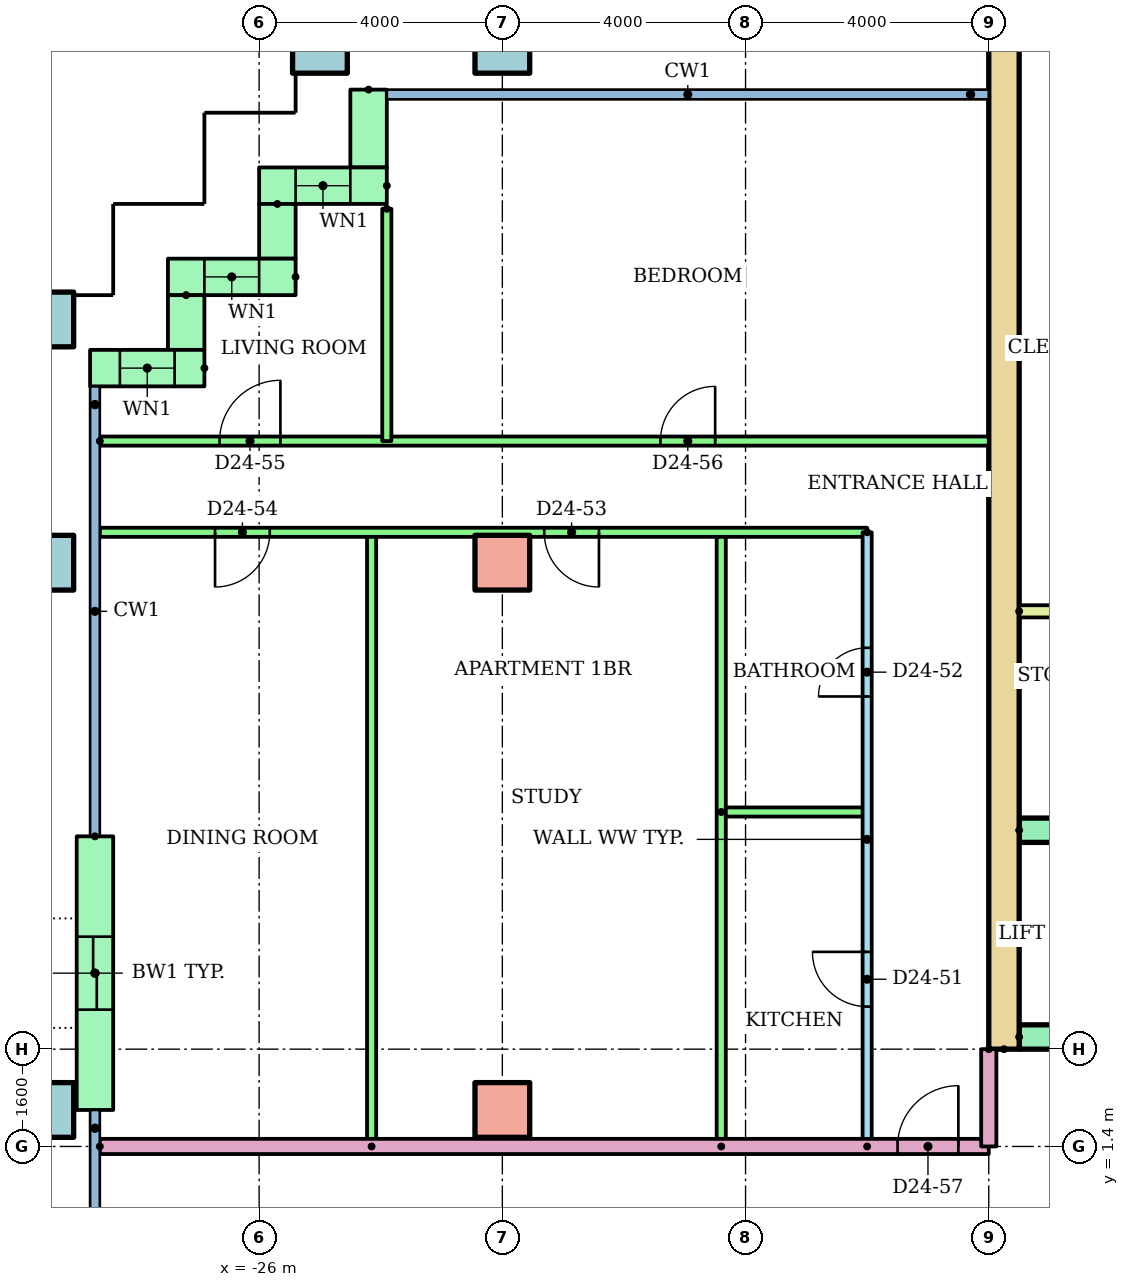
"""IFC4 building model, lengths in metres.
Left out: names, types, materials, properties, quantities, classifications, styles, units other than length and angle.
Written with IfcOpenShell. Run it as: python <this file> out.ifc"""

import sys

from ifc_helpers import new_model, si_unit, direction, frame, frame_2d, origin, origin_2d, place, context, subcontext, project, spatial, rectangle, hollow_rectangle, extrude, element, fill, save


model = new_model("IFC4")
c1 = context("Model", 3, precision=1e-05, world=origin(), true_north=direction((0.0, 1.0)))
c2 = subcontext(c1, "Body", "Model", "MODEL_VIEW")
j1 = project(units=[si_unit("LENGTHUNIT", "METRE"), si_unit("PLANEANGLEUNIT", "RADIAN")], contexts=[c1])
p1 = place(None, origin())
s1 = spatial("IfcSite", under=j1, at=p1, CompositionType="ELEMENT")
p2 = place(p1, origin())
s2 = spatial("IfcBuilding", under=s1, at=p2, CompositionType="ELEMENT")
p3 = place(p2, frame((0.0, 0.0, 93.5)))
s3 = spatial("IfcBuildingStorey", under=s2, at=p3, CompositionType="ELEMENT", Elevation=93.5)
p4 = place(p3, frame((-29.5, 2.0, 0.0)))
e1 = element("IfcColumn", 1, at=p4, inside=s3, PredefinedType="COLUMN", context=c2, shape_type="SweptSolid", body=[
    extrude(hollow_rectangle(XDim=0.9, YDim=0.9, WallThickness=0.045, at=origin_2d()), origin(), (0.0, 0.0, 1.0), 3.2),
])
p5 = place(p3, frame((-22.0, 2.0, 0.0)))
e2 = element("IfcColumn", 2, at=p5, inside=s3, PredefinedType="COLUMN", context=c2, shape_type="SweptSolid", body=[
    extrude(rectangle(XDim=0.9, YDim=0.9, at=origin_2d()), origin(), (0.0, 0.0, 1.0), 3.2),
])
p6 = place(p3, frame((-29.5, 11.0, 0.0)))
e3 = element("IfcColumn", 3, at=p6, inside=s3, PredefinedType="COLUMN", context=c2, shape_type="SweptSolid", body=[
    extrude(hollow_rectangle(XDim=0.9, YDim=0.9, WallThickness=0.045, at=origin_2d()), origin(), (0.0, 0.0, 1.0), 3.2),
])
p7 = place(p3, frame((-22.0, 11.0, 0.0)))
e4 = element("IfcColumn", 4, at=p7, inside=s3, PredefinedType="COLUMN", context=c2, shape_type="SweptSolid", body=[
    extrude(rectangle(XDim=0.9, YDim=0.9, at=origin_2d()), origin(), (0.0, 0.0, 1.0), 3.2),
])
for number, where in (
    (5, (-29.5, 15.0, 0.0)),
    (6, (-25.0, 19.5, 0.0)),
    (7, (-22.0, 19.5, 0.0)),
):
    element("IfcColumn", number, at=place(p3, frame(where)), inside=s3, PredefinedType="COLUMN", context=c2, shape_type="SweptSolid", body=[
        extrude(hollow_rectangle(XDim=0.9, YDim=0.9, WallThickness=0.045, at=origin_2d()), origin(), (0.0, 0.0, 1.0), 3.2),
    ])
p8 = place(p3, frame((-24.2, 18.78, 0.0), z_axis=(0.0, 0.0, 1.0), x_axis=(0.0, -1.0, 0.0)))
e8 = element("IfcWall", 8, at=p8, inside=s3, PredefinedType="STANDARD", context=c2, shape_type="SweptSolid", body=[
    extrude(rectangle(XDim=1.28, YDim=0.6, at=frame_2d((0.64, 0.0))), origin(), (0.0, 0.0, 1.0), 2.92),
])
p9 = place(p3, frame((-23.9, 17.2, 0.0), z_axis=(0.0, 0.0, 1.0), x_axis=(-1.0, 0.0, 0.0)))
e9 = element("IfcWall", 9, at=p9, inside=s3, PredefinedType="STANDARD", context=c2, shape_type="SweptSolid", body=[
    extrude(rectangle(XDim=2.1, YDim=0.6, at=frame_2d((1.05, 0.0))), origin(), (0.0, 0.0, 1.0), 2.92),
])
p10 = place(p9, frame((0.6, 0.0, 0.9)))
e10 = element("IfcOpeningElement", 10, at=p10, cuts=e9, PredefinedType="OPENING", context=c2, shape_type="SweptSolid", body=[
    extrude(rectangle(XDim=0.9, YDim=1.5, at=frame_2d((0.45, 0.75))), frame((0.0, 0.31, 0.0), z_axis=(0.0, -1.0, 0.0), x_axis=(1.0, 0.0, 0.0)), (0.0, 0.0, 1.0), 0.62),
])
p11 = place(p3, frame((-25.7, 16.9, 0.0), z_axis=(0.0, 0.0, 1.0), x_axis=(0.0, -1.0, 0.0)))
e11 = element("IfcWall", 11, at=p11, inside=s3, PredefinedType="STANDARD", context=c2, shape_type="SweptSolid", body=[
    extrude(rectangle(XDim=0.9, YDim=0.6, at=frame_2d((0.45, 0.0))), origin(), (0.0, 0.0, 1.0), 2.92),
])
p12 = place(p3, frame((-25.4, 15.7, 0.0), z_axis=(0.0, 0.0, 1.0), x_axis=(-1.0, 0.0, 0.0)))
e12 = element("IfcWall", 12, at=p12, inside=s3, PredefinedType="STANDARD", context=c2, shape_type="SweptSolid", body=[
    extrude(rectangle(XDim=2.1, YDim=0.6, at=frame_2d((1.05, 0.0))), origin(), (0.0, 0.0, 1.0), 2.92),
])
p13 = place(p12, frame((0.6, 0.0, 0.9)))
e13 = element("IfcOpeningElement", 13, at=p13, cuts=e12, PredefinedType="OPENING", context=c2, shape_type="SweptSolid", body=[
    extrude(rectangle(XDim=0.9, YDim=1.5, at=frame_2d((0.45, 0.75))), frame((0.0, 0.31, 0.0), z_axis=(0.0, -1.0, 0.0), x_axis=(1.0, 0.0, 0.0)), (0.0, 0.0, 1.0), 0.62),
])
p14 = place(p3, frame((-27.2, 15.4, 0.0), z_axis=(0.0, 0.0, 1.0), x_axis=(0.0, -1.0, 0.0)))
e14 = element("IfcWall", 14, at=p14, inside=s3, PredefinedType="STANDARD", context=c2, shape_type="SweptSolid", body=[
    extrude(rectangle(XDim=0.9, YDim=0.6, at=frame_2d((0.45, 0.0))), origin(), (0.0, 0.0, 1.0), 2.92),
])
p15 = place(p3, frame((-26.9, 14.2, 0.0), z_axis=(0.0, 0.0, 1.0), x_axis=(-1.0, 0.0, 0.0)))
e15 = element("IfcWall", 15, at=p15, inside=s3, PredefinedType="STANDARD", context=c2, shape_type="SweptSolid", body=[
    extrude(rectangle(XDim=1.88, YDim=0.6, at=frame_2d((0.94, 0.0))), origin(), (0.0, 0.0, 1.0), 2.92),
])
p16 = place(p15, frame((0.49, 0.0, 0.9)))
e16 = element("IfcOpeningElement", 16, at=p16, cuts=e15, PredefinedType="OPENING", context=c2, shape_type="SweptSolid", body=[
    extrude(rectangle(XDim=0.9, YDim=1.5, at=frame_2d((0.45, 0.75))), frame((0.0, 0.31, 0.0), z_axis=(0.0, -1.0, 0.0), x_axis=(1.0, 0.0, 0.0)), (0.0, 0.0, 1.0), 0.62),
])
p17 = place(p3, frame((-28.7, 6.5, 0.0), z_axis=(0.0, 0.0, 1.0), x_axis=(0.0, -1.0, 0.0)))
e17 = element("IfcWall", 17, at=p17, inside=s3, PredefinedType="STANDARD", context=c2, shape_type="SweptSolid", body=[
    extrude(rectangle(XDim=4.5, YDim=0.6, at=frame_2d((2.25, 0.0))), origin(), (0.0, 0.0, 1.0), 2.92),
])
p18 = place(p17, frame((1.65, 0.0, 0.0)))
e18 = element("IfcOpeningElement", 18, at=p18, cuts=e17, PredefinedType="OPENING", context=c2, shape_type="SweptSolid", body=[
    extrude(rectangle(XDim=1.2, YDim=2.1, at=frame_2d((0.6, 1.05))), frame((0.0, 0.31, 0.0), z_axis=(0.0, -1.0, 0.0), x_axis=(1.0, 0.0, 0.0)), (0.0, 0.0, 1.0), 0.62),
])
p19 = place(p3, frame((-13.75, 3.0, 0.0), z_axis=(0.0, 0.0, 1.0), x_axis=(0.0, 1.0, 0.0)))
e19 = element("IfcWall", 19, at=p19, inside=s3, PredefinedType="SHEAR", context=c2, shape_type="SweptSolid", body=[
    extrude(rectangle(XDim=17.0, YDim=0.5, at=frame_2d((8.5, 0.0))), origin(), (0.0, 0.0, 1.0), 2.92),
])
p20 = place(p3, frame((-13.5, 3.2, 0.0)))
e20 = element("IfcWall", 20, at=p20, inside=s3, PredefinedType="SHEAR", context=c2, shape_type="SweptSolid", body=[
    extrude(rectangle(XDim=27.0, YDim=0.4, at=frame_2d((13.5, 0.0))), origin(), (0.0, 0.0, 1.0), 2.92),
])
p21 = place(p20, frame((6.861, 0.0, 0.0)))
e21 = element("IfcOpeningElement", 21, at=p21, cuts=e20, PredefinedType="OPENING", context=c2, shape_type="SweptSolid", body=[
    extrude(rectangle(XDim=1.1, YDim=2.1, at=frame_2d((0.55, 1.05))), frame((0.0, 0.21, 0.0), z_axis=(0.0, -1.0, 0.0), x_axis=(1.0, 0.0, 0.0)), (0.0, 0.0, 1.0), 0.42),
])
p22 = place(p20, frame((9.906, 0.0, 0.0)))
e22 = element("IfcOpeningElement", 22, at=p22, cuts=e20, PredefinedType="OPENING", context=c2, shape_type="SweptSolid", body=[
    extrude(rectangle(XDim=1.1, YDim=2.1, at=frame_2d((0.55, 1.05))), frame((0.0, 0.21, 0.0), z_axis=(0.0, -1.0, 0.0), x_axis=(1.0, 0.0, 0.0)), (0.0, 0.0, 1.0), 0.42),
])
p23 = place(p20, frame((15.994, 0.0, 0.0)))
e23 = element("IfcOpeningElement", 23, at=p23, cuts=e20, PredefinedType="OPENING", context=c2, shape_type="SweptSolid", body=[
    extrude(rectangle(XDim=1.1, YDim=2.1, at=frame_2d((0.55, 1.05))), frame((0.0, 0.21, 0.0), z_axis=(0.0, -1.0, 0.0), x_axis=(1.0, 0.0, 0.0)), (0.0, 0.0, 1.0), 0.42),
])
p24 = place(p20, frame((19.039, 0.0, 0.0)))
e24 = element("IfcOpeningElement", 24, at=p24, cuts=e20, PredefinedType="OPENING", context=c2, shape_type="SweptSolid", body=[
    extrude(rectangle(XDim=1.1, YDim=2.1, at=frame_2d((0.55, 1.05))), frame((0.0, 0.21, 0.0), z_axis=(0.0, -1.0, 0.0), x_axis=(1.0, 0.0, 0.0)), (0.0, 0.0, 1.0), 0.42),
])
p25 = place(p20, frame((12.6, 0.0, 0.0)))
e25 = element("IfcOpeningElement", 25, at=p25, cuts=e20, PredefinedType="OPENING", context=c2, shape_type="SweptSolid", body=[
    extrude(rectangle(XDim=1.8, YDim=2.1, at=frame_2d((0.9, 1.05))), frame((0.0, 0.21, 0.0), z_axis=(0.0, -1.0, 0.0), x_axis=(1.0, 0.0, 0.0)), (0.0, 0.0, 1.0), 0.42),
])
p26 = place(p3, frame((-13.5, 6.6, 0.0)))
e26 = element("IfcWall", 26, at=p26, inside=s3, PredefinedType="SHEAR", context=c2, shape_type="SweptSolid", body=[
    extrude(rectangle(XDim=11.978, YDim=0.4, at=frame_2d((5.989, 0.0))), origin(), (0.0, 0.0, 1.0), 2.92),
])
p27 = place(p3, frame((-13.5, 10.2, 0.0)))
e27 = element("IfcWall", 27, at=p27, inside=s3, PredefinedType="PARTITIONING", context=c2, shape_type="SweptSolid", body=[
    extrude(rectangle(XDim=3.9, YDim=0.2, at=frame_2d((1.95, 0.0))), origin(), (0.0, 0.0, 1.0), 2.92),
])
p28 = place(p3, frame((-16.0, 1.4, 0.0), z_axis=(0.0, 0.0, 1.0), x_axis=(0.0, 1.0, 0.0)))
e28 = element("IfcWall", 28, at=p28, inside=s3, PredefinedType="PARTITIONING", context=c2, shape_type="SweptSolid", body=[
    extrude(rectangle(XDim=10.1, YDim=0.15, at=frame_2d((5.05, 0.0))), origin(), (0.0, 0.0, 1.0), 2.4),
])
p29 = place(p28, frame((2.3, 0.0, 0.0)))
e29 = element("IfcOpeningElement", 29, at=p29, cuts=e28, PredefinedType="OPENING", context=c2, shape_type="SweptSolid", body=[
    extrude(rectangle(XDim=0.9, YDim=2.1, at=frame_2d((0.45, 1.05))), frame((0.0, 0.085, 0.0), z_axis=(0.0, -1.0, 0.0), x_axis=(1.0, 0.0, 0.0)), (0.0, 0.0, 1.0), 0.17),
])
p30 = place(p28, frame((7.4, 0.0, 0.0)))
e30 = element("IfcOpeningElement", 30, at=p30, cuts=e28, PredefinedType="OPENING", context=c2, shape_type="SweptSolid", body=[
    extrude(rectangle(XDim=0.8, YDim=2.1, at=frame_2d((0.4, 1.05))), frame((0.0, 0.085, 0.0), z_axis=(0.0, -1.0, 0.0), x_axis=(1.0, 0.0, 0.0)), (0.0, 0.0, 1.0), 0.17),
])
p31 = place(p3, frame((-18.4, 6.9, 0.0)))
e31 = element("IfcWall", 31, at=p31, inside=s3, PredefinedType="PARTITIONING", context=c2, shape_type="SweptSolid", body=[
    extrude(rectangle(XDim=2.4, YDim=0.15, at=frame_2d((1.2, 0.0))), origin(), (0.0, 0.0, 1.0), 2.4),
])
for number, where, z_axis, x_axis in (
    (32, (-18.4, 1.4, 0.0), (0.0, 0.0, 1.0), (0.0, 1.0, 0.0)),
    (33, (-24.15, 1.4, 0.0), (0.0, 0.0, 1.0), (0.0, 1.0, 0.0)),
):
    element("IfcWall", number, at=place(p3, frame(where, z_axis=z_axis, x_axis=x_axis)), inside=s3, PredefinedType="PARTITIONING", context=c2, shape_type="SweptSolid", body=[
        extrude(rectangle(XDim=10.1, YDim=0.15, at=frame_2d((5.05, 0.0))), origin(), (0.0, 0.0, 1.0), 2.4),
    ])
p32 = place(p3, frame((-16.0, 11.5, 0.0), z_axis=(0.0, 0.0, 1.0), x_axis=(-1.0, 0.0, 0.0)))
e34 = element("IfcWall", 34, at=p32, inside=s3, PredefinedType="PARTITIONING", context=c2, shape_type="SweptSolid", body=[
    extrude(rectangle(XDim=12.62, YDim=0.15, at=frame_2d((6.31, 0.0))), origin(), (0.0, 0.0, 1.0), 2.4),
])
p33 = place(p32, frame((4.411, 0.0, 0.0)))
e35 = element("IfcOpeningElement", 35, at=p33, cuts=e34, PredefinedType="OPENING", context=c2, shape_type="SweptSolid", body=[
    extrude(rectangle(XDim=0.9, YDim=2.1, at=frame_2d((0.45, 1.05))), frame((0.0, 0.085, 0.0), z_axis=(0.0, -1.0, 0.0), x_axis=(1.0, 0.0, 0.0)), (0.0, 0.0, 1.0), 0.17),
])
p34 = place(p32, frame((9.825, 0.0, 0.0)))
e36 = element("IfcOpeningElement", 36, at=p34, cuts=e34, PredefinedType="OPENING", context=c2, shape_type="SweptSolid", body=[
    extrude(rectangle(XDim=0.9, YDim=2.1, at=frame_2d((0.45, 1.05))), frame((0.0, 0.085, 0.0), z_axis=(0.0, -1.0, 0.0), x_axis=(1.0, 0.0, 0.0)), (0.0, 0.0, 1.0), 0.17),
])
p35 = place(p3, frame((-28.62, 13.0, 0.0)))
e37 = element("IfcWall", 37, at=p35, inside=s3, PredefinedType="PARTITIONING", context=c2, shape_type="SweptSolid", body=[
    extrude(rectangle(XDim=14.62, YDim=0.15, at=frame_2d((7.31, 0.0))), origin(), (0.0, 0.0, 1.0), 2.4),
])
p36 = place(p35, frame((1.97, 0.0, 0.0)))
e38 = element("IfcOpeningElement", 38, at=p36, cuts=e37, PredefinedType="OPENING", context=c2, shape_type="SweptSolid", body=[
    extrude(rectangle(XDim=1.0, YDim=2.1, at=frame_2d((0.5, 1.05))), frame((0.0, 0.085, 0.0), z_axis=(0.0, -1.0, 0.0), x_axis=(1.0, 0.0, 0.0)), (0.0, 0.0, 1.0), 0.17),
])
p37 = place(p35, frame((9.22, 0.0, 0.0)))
e39 = element("IfcOpeningElement", 39, at=p37, cuts=e37, PredefinedType="OPENING", context=c2, shape_type="SweptSolid", body=[
    extrude(rectangle(XDim=0.9, YDim=2.1, at=frame_2d((0.45, 1.05))), frame((0.0, 0.085, 0.0), z_axis=(0.0, -1.0, 0.0), x_axis=(1.0, 0.0, 0.0)), (0.0, 0.0, 1.0), 0.17),
])
p38 = place(p3, frame((-23.9, 16.82, 0.0), z_axis=(0.0, 0.0, 1.0), x_axis=(0.0, -1.0, 0.0)))
e40 = element("IfcWall", 40, at=p38, inside=s3, PredefinedType="PARTITIONING", context=c2, shape_type="SweptSolid", body=[
    extrude(rectangle(XDim=3.82, YDim=0.15, at=frame_2d((1.91, 0.0))), origin(), (0.0, 0.0, 1.0), 2.4),
])
p39 = place(p3, frame((-28.62, 1.4, 0.0)))
e41 = element("IfcWall", 41, at=p39, inside=s3, PredefinedType="PARTITIONING", context=c2, shape_type="SweptSolid", body=[
    extrude(rectangle(XDim=14.62, YDim=0.25, at=frame_2d((7.31, 0.0))), origin(), (0.0, 0.0, 1.0), 2.4),
])
p40 = place(p39, frame((13.12, 0.0, 0.0)))
e42 = element("IfcOpeningElement", 42, at=p40, cuts=e41, PredefinedType="OPENING", context=c2, shape_type="SweptSolid", body=[
    extrude(rectangle(XDim=1.0, YDim=2.1, at=frame_2d((0.5, 1.05))), frame((0.0, 0.135, 0.0), z_axis=(0.0, -1.0, 0.0), x_axis=(1.0, 0.0, 0.0)), (0.0, 0.0, 1.0), 0.27),
])
p41 = place(p3, frame((-14.0, 3.0, 0.0), z_axis=(0.0, 0.0, 1.0), x_axis=(0.0, -1.0, 0.0)))
e43 = element("IfcWall", 43, at=p41, inside=s3, PredefinedType="PARTITIONING", context=c2, shape_type="SweptSolid", body=[
    extrude(rectangle(XDim=1.6, YDim=0.25, at=frame_2d((0.8, 0.0))), origin(), (0.0, 0.0, 1.0), 2.4),
])
p42 = place(p10, origin())
e44 = element("IfcWindow", 44, at=p42, inside=s3, PartitioningType="SINGLE_PANEL", PredefinedType="WINDOW", context=c2, shape_type="SweptSolid", body=[
    extrude(rectangle(XDim=0.9, YDim=1.5, at=frame_2d((0.45, 0.75))), frame((0.0, 0.03, 0.0), z_axis=(0.0, -1.0, 0.0), x_axis=(1.0, 0.0, 0.0)), (0.0, 0.0, 1.0), 0.06),
])
fill(e10, e44)
p43 = place(p13, origin())
e45 = element("IfcWindow", 45, at=p43, inside=s3, PartitioningType="SINGLE_PANEL", PredefinedType="WINDOW", context=c2, shape_type="SweptSolid", body=[
    extrude(rectangle(XDim=0.9, YDim=1.5, at=frame_2d((0.45, 0.75))), frame((0.0, 0.03, 0.0), z_axis=(0.0, -1.0, 0.0), x_axis=(1.0, 0.0, 0.0)), (0.0, 0.0, 1.0), 0.06),
])
fill(e13, e45)
p44 = place(p16, origin())
e46 = element("IfcWindow", 46, at=p44, inside=s3, PartitioningType="SINGLE_PANEL", PredefinedType="WINDOW", context=c2, shape_type="SweptSolid", body=[
    extrude(rectangle(XDim=0.9, YDim=1.5, at=frame_2d((0.45, 0.75))), frame((0.0, 0.03, 0.0), z_axis=(0.0, -1.0, 0.0), x_axis=(1.0, 0.0, 0.0)), (0.0, 0.0, 1.0), 0.06),
])
fill(e16, e46)
p45 = place(p29, origin())
e47 = element("IfcDoor", 47, at=p45, inside=s3, OperationType="SINGLE_SWING_RIGHT", PredefinedType="DOOR", context=c2, shape_type="SweptSolid", body=[
    extrude(rectangle(XDim=0.9, YDim=2.1, at=frame_2d((0.45, 1.05))), frame((0.0, 0.025, 0.0), z_axis=(0.0, -1.0, 0.0), x_axis=(1.0, 0.0, 0.0)), (0.0, 0.0, 1.0), 0.05),
])
fill(e29, e47)
p46 = place(p30, origin())
e48 = element("IfcDoor", 48, at=p46, inside=s3, OperationType="SINGLE_SWING_LEFT", PredefinedType="DOOR", context=c2, shape_type="SweptSolid", body=[
    extrude(rectangle(XDim=0.8, YDim=2.1, at=frame_2d((0.4, 1.05))), frame((0.0, 0.025, 0.0), z_axis=(0.0, -1.0, 0.0), x_axis=(1.0, 0.0, 0.0)), (0.0, 0.0, 1.0), 0.05),
])
fill(e30, e48)
p47 = place(p33, origin())
e49 = element("IfcDoor", 49, at=p47, inside=s3, OperationType="SINGLE_SWING_LEFT", PredefinedType="DOOR", context=c2, shape_type="SweptSolid", body=[
    extrude(rectangle(XDim=0.9, YDim=2.1, at=frame_2d((0.45, 1.05))), frame((0.0, 0.025, 0.0), z_axis=(0.0, -1.0, 0.0), x_axis=(1.0, 0.0, 0.0)), (0.0, 0.0, 1.0), 0.05),
])
fill(e35, e49)
p48 = place(p34, origin())
e50 = element("IfcDoor", 50, at=p48, inside=s3, OperationType="SINGLE_SWING_RIGHT", PredefinedType="DOOR", context=c2, shape_type="SweptSolid", body=[
    extrude(rectangle(XDim=0.9, YDim=2.1, at=frame_2d((0.45, 1.05))), frame((0.0, 0.025, 0.0), z_axis=(0.0, -1.0, 0.0), x_axis=(1.0, 0.0, 0.0)), (0.0, 0.0, 1.0), 0.05),
])
fill(e36, e50)
p49 = place(p36, origin())
e51 = element("IfcDoor", 51, at=p49, inside=s3, OperationType="SINGLE_SWING_RIGHT", PredefinedType="DOOR", context=c2, shape_type="SweptSolid", body=[
    extrude(rectangle(XDim=1.0, YDim=2.1, at=frame_2d((0.5, 1.05))), frame((0.0, 0.025, 0.0), z_axis=(0.0, -1.0, 0.0), x_axis=(1.0, 0.0, 0.0)), (0.0, 0.0, 1.0), 0.05),
])
fill(e38, e51)
p50 = place(p37, origin())
e52 = element("IfcDoor", 52, at=p50, inside=s3, OperationType="SINGLE_SWING_RIGHT", PredefinedType="DOOR", context=c2, shape_type="SweptSolid", body=[
    extrude(rectangle(XDim=0.9, YDim=2.1, at=frame_2d((0.45, 1.05))), frame((0.0, 0.025, 0.0), z_axis=(0.0, -1.0, 0.0), x_axis=(1.0, 0.0, 0.0)), (0.0, 0.0, 1.0), 0.05),
])
fill(e39, e52)
p51 = place(p40, origin())
e53 = element("IfcDoor", 53, at=p51, inside=s3, OperationType="SINGLE_SWING_RIGHT", PredefinedType="DOOR", context=c2, shape_type="SweptSolid", body=[
    extrude(rectangle(XDim=1.0, YDim=2.1, at=frame_2d((0.5, 1.05))), frame((0.0, 0.025, 0.0), z_axis=(0.0, -1.0, 0.0), x_axis=(1.0, 0.0, 0.0)), (0.0, 0.0, 1.0), 0.05),
])
fill(e42, e53)
p52 = place(p18, origin())
e54 = element("IfcDoor", 54, at=p52, inside=s3, OperationType="SLIDING_TO_LEFT", PredefinedType="DOOR", context=c2, shape_type="SweptSolid", body=[
    extrude(rectangle(XDim=1.2, YDim=2.1, at=frame_2d((0.6, 1.05))), frame((0.0, 0.025, 0.0), z_axis=(0.0, -1.0, 0.0), x_axis=(1.0, 0.0, 0.0)), (0.0, 0.0, 1.0), 0.05),
])
fill(e18, e54)
save(model, sys.argv[1])
